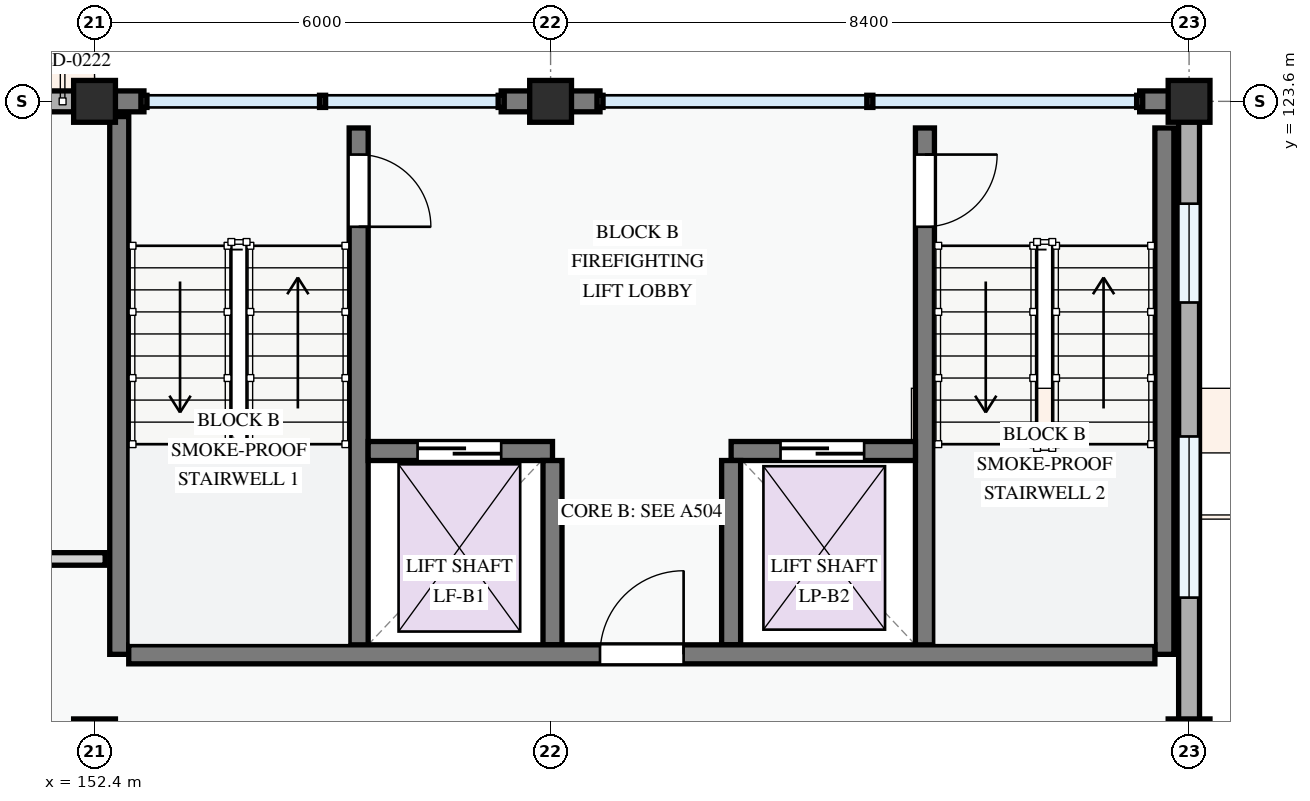
"""IFC4 building model, lengths in metres.
Left out: names, types, materials, properties, quantities, classifications, styles, units other than length and angle.
Written with IfcOpenShell. Run it as: python <this file> out.ifc"""

import sys

from ifc_helpers import new_model, si_unit, direction, frame, frame_2d, origin, origin_2d, place, context, subcontext, project, spatial, rectangle, extrude, element, fill, save


model = new_model("IFC4")
c1 = context("Model", 3, precision=1e-05, world=origin(), true_north=direction((0.0, 1.0)))
c2 = subcontext(c1, "Body", "Model", "MODEL_VIEW")
j1 = project(units=[si_unit("LENGTHUNIT", "METRE"), si_unit("PLANEANGLEUNIT", "RADIAN")], contexts=[c1])
p1 = place(None, origin())
s1 = spatial("IfcSite", under=j1, at=p1, CompositionType="ELEMENT")
p2 = place(p1, origin())
s2 = spatial("IfcBuilding", under=s1, at=p2, CompositionType="ELEMENT")
p3 = place(p2, frame((0.0, 0.0, 27.9)))
s3 = spatial("IfcBuildingStorey", under=s2, at=p3, CompositionType="ELEMENT", Elevation=27.9)
for number, where, z_axis, x_axis in (
    (1, (152.4, 115.2, 0.0), (0.0, 0.0, 1.0), (1.0, 0.0, 0.0)),
    (2, (152.4, 123.6, 0.0), (0.0, 0.0, 1.0), (1.0, 0.0, 0.0)),
    (3, (158.4, 123.6, 0.0), (0.0, 0.0, 1.0), (1.0, 0.0, 0.0)),
    (4, (166.8, 115.2, 0.0), (0.0, 0.0, 1.0), (1.0, 0.0, 0.0)),
    (5, (166.8, 123.6, 0.0), (0.0, 0.0, 1.0), (1.0, 0.0, 0.0)),
):
    element("IfcColumn", number, at=place(p3, frame(where, z_axis=z_axis, x_axis=x_axis)), inside=s3, PredefinedType="COLUMN", context=c2, shape_type="SweptSolid", body=[
        extrude(rectangle(XDim=0.55, YDim=0.55, at=origin_2d()), origin(), (0.0, 0.0, 1.0), 3.3),
    ])
p4 = place(p3, frame((166.8, 115.2, 0.0), z_axis=(0.0, 0.0, 1.0), x_axis=(0.0, 1.0, 0.0)))
e6 = element("IfcWall", 6, at=p4, inside=s3, PredefinedType="STANDARD", context=c2, shape_type="SweptSolid", body=[
    extrude(rectangle(XDim=8.4, YDim=0.275, at=frame_2d((4.2, 0.0))), origin(), (0.0, 0.0, 1.0), 2.345),
])
p5 = place(p4, frame((1.871, 0.0, 0.78)))
e7 = element("IfcOpeningElement", 7, at=p5, cuts=e6, PredefinedType="OPENING", context=c2, shape_type="SweptSolid", body=[
    extrude(rectangle(XDim=2.12, YDim=1.44, at=frame_2d((1.06, 0.72))), frame((0.0, 0.147, 0.0), z_axis=(0.0, -1.0, 0.0), x_axis=(1.0, 0.0, 0.0)), (0.0, 0.0, 1.0), 0.295),
])
p6 = place(p4, frame((5.754, 0.0, 0.78)))
e8 = element("IfcOpeningElement", 8, at=p6, cuts=e6, PredefinedType="OPENING", context=c2, shape_type="SweptSolid", body=[
    extrude(rectangle(XDim=1.3, YDim=1.4, at=frame_2d((0.65, 0.7))), frame((0.0, 0.147, 0.0), z_axis=(0.0, -1.0, 0.0), x_axis=(1.0, 0.0, 0.0)), (0.0, 0.0, 1.0), 0.295),
])
p7 = place(p3, frame((166.66, 123.6, 0.0), z_axis=(0.0, 0.0, 1.0), x_axis=(-1.0, 0.0, 0.0)))
e9 = element("IfcWall", 9, at=p7, inside=s3, PredefinedType="STANDARD", context=c2, shape_type="SweptSolid", body=[
    extrude(rectangle(XDim=0.51, YDim=0.275, at=frame_2d((0.255, 0.0))), origin(), (0.0, 0.0, 1.0), 3.04),
])
p8 = place(p3, frame((159.05, 123.6, 0.0), z_axis=(0.0, 0.0, 1.0), x_axis=(-1.0, 0.0, 0.0)))
e10 = element("IfcWall", 10, at=p8, inside=s3, PredefinedType="STANDARD", context=c2, shape_type="SweptSolid", body=[
    extrude(rectangle(XDim=0.65, YDim=0.275, at=frame_2d((0.325, 0.0))), origin(), (0.0, 0.0, 1.0), 3.04),
])
p9 = place(p3, frame((158.4, 123.6, 0.0), z_axis=(0.0, 0.0, 1.0), x_axis=(-1.0, 0.0, 0.0)))
e11 = element("IfcWall", 11, at=p9, inside=s3, PredefinedType="STANDARD", context=c2, shape_type="SweptSolid", body=[
    extrude(rectangle(XDim=0.65, YDim=0.275, at=frame_2d((0.325, 0.0))), origin(), (0.0, 0.0, 1.0), 3.04),
])
p10 = place(p3, frame((153.05, 123.6, 0.0), z_axis=(0.0, 0.0, 1.0), x_axis=(-1.0, 0.0, 0.0)))
e12 = element("IfcWall", 12, at=p10, inside=s3, PredefinedType="STANDARD", context=c2, shape_type="SweptSolid", body=[
    extrude(rectangle(XDim=0.65, YDim=0.275, at=frame_2d((0.325, 0.0))), origin(), (0.0, 0.0, 1.0), 3.04),
])
p11 = place(p3, frame((152.4, 123.6, 0.0), z_axis=(0.0, 0.0, 1.0), x_axis=(-1.0, 0.0, 0.0)))
e13 = element("IfcWall", 13, at=p11, inside=s3, PredefinedType="STANDARD", context=c2, shape_type="SweptSolid", body=[
    extrude(rectangle(XDim=8.4, YDim=0.275, at=frame_2d((4.2, 0.0))), origin(), (0.0, 0.0, 1.0), 2.345),
])
p12 = place(p11, frame((0.62, 0.0, 0.0)))
e14 = element("IfcOpeningElement", 14, at=p12, cuts=e13, PredefinedType="OPENING", context=c2, shape_type="SweptSolid", body=[
    extrude(rectangle(XDim=1.3, YDim=2.15, at=frame_2d((0.65, 1.075))), frame((0.0, 0.147, 0.0), z_axis=(0.0, -1.0, 0.0), x_axis=(1.0, 0.0, 0.0)), (0.0, 0.0, 1.0), 0.295),
])
p13 = place(p11, frame((2.69, 0.0, 0.78)))
e15 = element("IfcOpeningElement", 15, at=p13, cuts=e13, PredefinedType="OPENING", context=c2, shape_type="SweptSolid", body=[
    extrude(rectangle(XDim=1.75, YDim=1.45, at=frame_2d((0.875, 0.725))), frame((0.0, 0.147, 0.0), z_axis=(0.0, -1.0, 0.0), x_axis=(1.0, 0.0, 0.0)), (0.0, 0.0, 1.0), 0.295),
])
p14 = place(p11, frame((5.905, 0.0, 0.78)))
e16 = element("IfcOpeningElement", 16, at=p14, cuts=e13, PredefinedType="OPENING", context=c2, shape_type="SweptSolid", body=[
    extrude(rectangle(XDim=1.42, YDim=1.38, at=frame_2d((0.71, 0.69))), frame((0.0, 0.147, 0.0), z_axis=(0.0, -1.0, 0.0), x_axis=(1.0, 0.0, 0.0)), (0.0, 0.0, 1.0), 0.295),
])
p15 = place(p3, frame((155.875, 123.25, 0.0), z_axis=(0.0, 0.0, 1.0), x_axis=(0.0, -1.0, 0.0)))
e17 = element("IfcWall", 17, at=p15, inside=s3, PredefinedType="SHEAR", context=c2, shape_type="SweptSolid", body=[
    extrude(rectangle(XDim=6.925, YDim=0.25, at=frame_2d((3.462, 0.0))), origin(), (0.0, 0.0, 1.0), 3.0),
])
p16 = place(p15, frame((0.35, 0.0, 0.0)))
e18 = element("IfcOpeningElement", 18, at=p16, cuts=e17, PredefinedType="OPENING", context=c2, shape_type="SweptSolid", body=[
    extrude(rectangle(XDim=0.95, YDim=2.1, at=frame_2d((0.475, 1.05))), frame((0.0, 0.135, 0.0), z_axis=(0.0, -1.0, 0.0), x_axis=(1.0, 0.0, 0.0)), (0.0, 0.0, 1.0), 0.27),
])
p17 = place(p3, frame((152.725, 123.4, 0.0), z_axis=(0.0, 0.0, 1.0), x_axis=(0.0, -1.0, 0.0)))
e19 = element("IfcWall", 19, at=p17, inside=s3, PredefinedType="SHEAR", context=c2, shape_type="SweptSolid", body=[
    extrude(rectangle(XDim=7.075, YDim=0.25, at=frame_2d((3.538, 0.0))), origin(), (0.0, 0.0, 1.0), 3.0),
])
p18 = place(p3, frame((166.475, 123.25, 0.0), z_axis=(0.0, 0.0, 1.0), x_axis=(0.0, -1.0, 0.0)))
e20 = element("IfcWall", 20, at=p18, inside=s3, PredefinedType="SHEAR", context=c2, shape_type="SweptSolid", body=[
    extrude(rectangle(XDim=6.925, YDim=0.25, at=frame_2d((3.462, 0.0))), origin(), (0.0, 0.0, 1.0), 3.0),
])
p19 = place(p3, frame((163.325, 123.25, 0.0), z_axis=(0.0, 0.0, 1.0), x_axis=(0.0, -1.0, 0.0)))
e21 = element("IfcWall", 21, at=p19, inside=s3, PredefinedType="SHEAR", context=c2, shape_type="SweptSolid", body=[
    extrude(rectangle(XDim=6.925, YDim=0.25, at=frame_2d((3.462, 0.0))), origin(), (0.0, 0.0, 1.0), 3.0),
])
p20 = place(p19, frame((0.35, 0.0, 0.0)))
e22 = element("IfcOpeningElement", 22, at=p20, cuts=e21, PredefinedType="OPENING", context=c2, shape_type="SweptSolid", body=[
    extrude(rectangle(XDim=0.95, YDim=2.1, at=frame_2d((0.475, 1.05))), frame((0.0, 0.135, 0.0), z_axis=(0.0, -1.0, 0.0), x_axis=(1.0, 0.0, 0.0)), (0.0, 0.0, 1.0), 0.27),
])
p21 = place(p3, frame((156.0, 119.0, 0.0), z_axis=(0.0, 0.0, 1.0), x_axis=(1.0, 0.0, 0.0)))
e23 = element("IfcWall", 23, at=p21, inside=s3, PredefinedType="SHEAR", context=c2, shape_type="SweptSolid", body=[
    extrude(rectangle(XDim=2.425, YDim=0.25, at=frame_2d((1.212, 0.0))), origin(), (0.0, 0.0, 1.0), 3.0),
])
p22 = place(p21, frame((0.65, 0.0, 0.0)))
e24 = element("IfcOpeningElement", 24, at=p22, cuts=e23, PredefinedType="OPENING", context=c2, shape_type="SweptSolid", body=[
    extrude(rectangle(XDim=1.1, YDim=2.15, at=frame_2d((0.55, 1.075))), frame((0.0, 0.135, 0.0), z_axis=(0.0, -1.0, 0.0), x_axis=(1.0, 0.0, 0.0)), (0.0, 0.0, 1.0), 0.27),
])
p23 = place(p3, frame((160.775, 119.0, 0.0), z_axis=(0.0, 0.0, 1.0), x_axis=(1.0, 0.0, 0.0)))
e25 = element("IfcWall", 25, at=p23, inside=s3, PredefinedType="SHEAR", context=c2, shape_type="SweptSolid", body=[
    extrude(rectangle(XDim=2.425, YDim=0.25, at=frame_2d((1.212, 0.0))), origin(), (0.0, 0.0, 1.0), 3.0),
])
p24 = place(p23, frame((0.65, 0.0, 0.0)))
e26 = element("IfcOpeningElement", 26, at=p24, cuts=e25, PredefinedType="OPENING", context=c2, shape_type="SweptSolid", body=[
    extrude(rectangle(XDim=1.1, YDim=2.15, at=frame_2d((0.55, 1.075))), frame((0.0, 0.135, 0.0), z_axis=(0.0, -1.0, 0.0), x_axis=(1.0, 0.0, 0.0)), (0.0, 0.0, 1.0), 0.27),
])
for number, where, z_axis, x_axis in (
    (27, (158.425, 118.875, 0.0), (0.0, 0.0, 1.0), (0.0, -1.0, 0.0)),
    (28, (160.775, 118.875, 0.0), (0.0, 0.0, 1.0), (0.0, -1.0, 0.0)),
):
    element("IfcWall", number, at=place(p3, frame(where, z_axis=z_axis, x_axis=x_axis)), inside=s3, PredefinedType="SHEAR", context=c2, shape_type="SweptSolid", body=[
        extrude(rectangle(XDim=2.425, YDim=0.25, at=frame_2d((1.212, 0.0))), origin(), (0.0, 0.0, 1.0), 3.0),
    ])
p25 = place(p3, frame((152.85, 116.325, 0.0), z_axis=(0.0, 0.0, 1.0), x_axis=(1.0, 0.0, 0.0)))
e29 = element("IfcWall", 29, at=p25, inside=s3, PredefinedType="SHEAR", context=c2, shape_type="SweptSolid", body=[
    extrude(rectangle(XDim=13.5, YDim=0.25, at=frame_2d((6.75, 0.0))), origin(), (0.0, 0.0, 1.0), 3.0),
])
p26 = place(p25, frame((6.2, 0.0, 0.0)))
e30 = element("IfcOpeningElement", 30, at=p26, cuts=e29, PredefinedType="OPENING", context=c2, shape_type="SweptSolid", body=[
    extrude(rectangle(XDim=1.1, YDim=2.15, at=frame_2d((0.55, 1.075))), frame((0.0, 0.135, 0.0), z_axis=(0.0, -1.0, 0.0), x_axis=(1.0, 0.0, 0.0)), (0.0, 0.0, 1.0), 0.27),
])
p27 = place(p3, frame((80.54, 117.58, 0.0), z_axis=(0.0, 0.0, 1.0), x_axis=(1.0, 0.0, 0.0)))
e31 = element("IfcWall", 31, at=p27, inside=s3, PredefinedType="PARTITIONING", context=c2, shape_type="SweptSolid", body=[
    extrude(rectangle(XDim=72.0, YDim=0.165, at=frame_2d((36.0, 0.0))), origin(), (0.0, 0.0, 1.0), 3.0),
])
p28 = place(p27, frame((9.562, 0.0, 0.0)))
e32 = element("IfcOpeningElement", 32, at=p28, cuts=e31, PredefinedType="OPENING", context=c2, shape_type="SweptSolid", body=[
    extrude(rectangle(XDim=0.96, YDim=2.12, at=frame_2d((0.48, 1.06))), frame((0.0, 0.093, 0.0), z_axis=(0.0, -1.0, 0.0), x_axis=(1.0, 0.0, 0.0)), (0.0, 0.0, 1.0), 0.185),
])
p29 = place(p27, frame((37.179, 0.0, 0.0)))
e33 = element("IfcOpeningElement", 33, at=p29, cuts=e31, PredefinedType="OPENING", context=c2, shape_type="SweptSolid", body=[
    extrude(rectangle(XDim=0.92, YDim=2.1, at=frame_2d((0.46, 1.05))), frame((0.0, 0.093, 0.0), z_axis=(0.0, -1.0, 0.0), x_axis=(1.0, 0.0, 0.0)), (0.0, 0.0, 1.0), 0.185),
])
p30 = place(p27, frame((52.799, 0.0, 0.0)))
e34 = element("IfcOpeningElement", 34, at=p30, cuts=e31, PredefinedType="OPENING", context=c2, shape_type="SweptSolid", body=[
    extrude(rectangle(XDim=0.92, YDim=2.1, at=frame_2d((0.46, 1.05))), frame((0.0, 0.093, 0.0), z_axis=(0.0, -1.0, 0.0), x_axis=(1.0, 0.0, 0.0)), (0.0, 0.0, 1.0), 0.185),
])
p31 = place(p5, origin())
e35 = element("IfcWindow", 35, at=p31, inside=s3, PartitioningType="DOUBLE_PANEL_VERTICAL", PredefinedType="WINDOW", context=c2, shape_type="SweptSolid", body=[
    extrude(rectangle(XDim=2.12, YDim=1.44, at=frame_2d((1.06, 0.72))), frame((0.0, 0.03, 0.0), z_axis=(0.0, -1.0, 0.0), x_axis=(1.0, 0.0, 0.0)), (0.0, 0.0, 1.0), 0.06),
])
fill(e7, e35)
p32 = place(p6, origin())
e36 = element("IfcWindow", 36, at=p32, inside=s3, PartitioningType="SINGLE_PANEL", PredefinedType="WINDOW", context=c2, shape_type="SweptSolid", body=[
    extrude(rectangle(XDim=1.3, YDim=1.4, at=frame_2d((0.65, 0.7))), frame((0.0, 0.03, 0.0), z_axis=(0.0, -1.0, 0.0), x_axis=(1.0, 0.0, 0.0)), (0.0, 0.0, 1.0), 0.06),
])
fill(e8, e36)
p33 = place(p16, origin())
e37 = element("IfcDoor", 37, at=p33, inside=s3, OperationType="SINGLE_SWING_RIGHT", PredefinedType="DOOR", context=c2, shape_type="SweptSolid", body=[
    extrude(rectangle(XDim=0.95, YDim=2.1, at=frame_2d((0.475, 1.05))), frame((0.0, 0.025, 0.0), z_axis=(0.0, -1.0, 0.0), x_axis=(1.0, 0.0, 0.0)), (0.0, 0.0, 1.0), 0.05),
])
fill(e18, e37)
p34 = place(p20, origin())
e38 = element("IfcDoor", 38, at=p34, inside=s3, OperationType="SINGLE_SWING_LEFT", PredefinedType="DOOR", context=c2, shape_type="SweptSolid", body=[
    extrude(rectangle(XDim=0.95, YDim=2.1, at=frame_2d((0.475, 1.05))), frame((0.0, 0.025, 0.0), z_axis=(0.0, -1.0, 0.0), x_axis=(1.0, 0.0, 0.0)), (0.0, 0.0, 1.0), 0.05),
])
fill(e22, e38)
p35 = place(p22, origin())
e39 = element("IfcDoor", 39, at=p35, inside=s3, OperationType="SLIDING_TO_LEFT", PredefinedType="DOOR", context=c2, shape_type="SweptSolid", body=[
    extrude(rectangle(XDim=1.1, YDim=2.15, at=frame_2d((0.55, 1.075))), frame((0.0, 0.025, 0.0), z_axis=(0.0, -1.0, 0.0), x_axis=(1.0, 0.0, 0.0)), (0.0, 0.0, 1.0), 0.05),
])
fill(e24, e39)
p36 = place(p24, origin())
e40 = element("IfcDoor", 40, at=p36, inside=s3, OperationType="SLIDING_TO_LEFT", PredefinedType="DOOR", context=c2, shape_type="SweptSolid", body=[
    extrude(rectangle(XDim=1.1, YDim=2.15, at=frame_2d((0.55, 1.075))), frame((0.0, 0.025, 0.0), z_axis=(0.0, -1.0, 0.0), x_axis=(1.0, 0.0, 0.0)), (0.0, 0.0, 1.0), 0.05),
])
fill(e26, e40)
p37 = place(p26, origin())
e41 = element("IfcDoor", 41, at=p37, inside=s3, OperationType="SINGLE_SWING_RIGHT", PredefinedType="DOOR", context=c2, shape_type="SweptSolid", body=[
    extrude(rectangle(XDim=1.1, YDim=2.15, at=frame_2d((0.55, 1.075))), frame((0.0, 0.025, 0.0), z_axis=(0.0, -1.0, 0.0), x_axis=(1.0, 0.0, 0.0)), (0.0, 0.0, 1.0), 0.05),
])
fill(e30, e41)
save(model, sys.argv[1])
